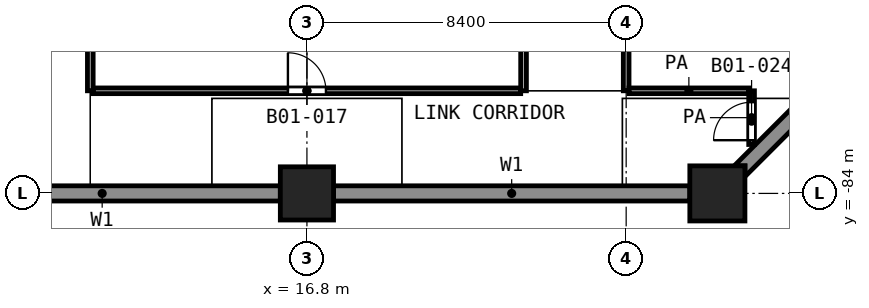
"""IFC4 building model, lengths in metres.
Left out: names, types, materials, properties, quantities, classifications, styles, units other than length and angle.
Written with IfcOpenShell. Run it as: python <this file> out.ifc"""

import sys

from ifc_helpers import new_model, si_unit, direction, frame, frame_2d, origin, origin_2d, place, context, subcontext, project, spatial, polyline, rectangle, outline, extrude, element, fill, save


model = new_model("IFC4")
c1 = context("Model", 3, precision=1e-05, world=origin(), true_north=direction((0.0, 1.0)))
c2 = subcontext(c1, "Body", "Model", "MODEL_VIEW")
j1 = project(units=[si_unit("LENGTHUNIT", "METRE"), si_unit("PLANEANGLEUNIT", "RADIAN")], contexts=[c1])
p1 = place(None, origin())
s1 = spatial("IfcSite", under=j1, at=p1, CompositionType="ELEMENT")
p2 = place(p1, origin())
s2 = spatial("IfcBuilding", under=s1, at=p2, CompositionType="ELEMENT")
p3 = place(p2, frame((0.0, 0.0, -6.0)))
s3 = spatial("IfcBuildingStorey", under=s2, at=p3, CompositionType="ELEMENT", Elevation=-6.0)
p4 = place(p3, origin())
e1 = element("IfcWall", 1, at=p4, inside=s3, PredefinedType="SOLIDWALL", context=c2, shape_type="SweptSolid", body=[
    extrude(outline(polyline([(28.325, -83.275), (28.042, -83.275), (32.875, -78.442), (32.875, -78.725), (33.158, -78.725), (28.325, -83.558), (28.325, -83.275)])), origin(), (0.0, 0.0, 1.0), 5.55),
])
e2 = element("IfcWall", 2, at=p4, inside=s3, PredefinedType="SOLIDWALL", context=c2, shape_type="SweptSolid", body=[
    extrude(outline(polyline([(6.725, -83.8), (16.1, -83.8), (16.1, -84.2), (6.725, -84.2), (6.725, -83.8)])), origin(), (0.0, 0.0, 1.0), 5.55),
])
e3 = element("IfcWall", 3, at=p4, inside=s3, PredefinedType="SOLIDWALL", context=c2, shape_type="SweptSolid", body=[
    extrude(outline(polyline([(17.5, -83.8), (26.875, -83.8), (26.875, -84.2), (17.5, -84.2), (17.5, -83.8)])), origin(), (0.0, 0.0, 1.0), 5.55),
])
p5 = place(p3, frame((16.8, -84.0, 0.0), z_axis=(0.0, 0.0, 1.0), x_axis=(1.0, 0.0, 0.0)))
e4 = element("IfcColumn", 4, at=p5, inside=s3, PredefinedType="COLUMN", context=c2, shape_type="SweptSolid", body=[
    extrude(rectangle(XDim=1.4, YDim=1.4, at=origin_2d()), origin(), (0.0, 0.0, 1.0), 6.0),
])
p6 = place(p3, frame((27.6, -84.0, 0.0), z_axis=(0.0, 0.0, 1.0), x_axis=(1.0, 0.0, 0.0)))
e5 = element("IfcColumn", 5, at=p6, inside=s3, PredefinedType="COLUMN", context=c2, shape_type="SweptSolid", body=[
    extrude(rectangle(XDim=1.45, YDim=1.45, at=origin_2d()), origin(), (0.0, 0.0, 1.0), 6.0),
])
p7 = place(p3, frame((11.175, -81.3, 0.0), z_axis=(0.0, 0.0, 1.0), x_axis=(1.0, 0.0, 0.0)))
e6 = element("IfcWall", 6, at=p7, inside=s3, PredefinedType="PARTITIONING", context=c2, shape_type="SweptSolid", body=[
    extrude(rectangle(XDim=11.25, YDim=0.15, at=frame_2d((5.625, 0.0))), origin(), (0.0, 0.0, 1.0), 5.55),
])
p8 = place(p7, frame((5.125, 0.0, 0.0)))
e7 = element("IfcOpeningElement", 7, at=p8, cuts=e6, PredefinedType="OPENING", context=c2, shape_type="SweptSolid", body=[
    extrude(rectangle(XDim=1.0, YDim=2.1, at=frame_2d((0.5, 1.05))), frame((0.0, 0.085, 0.0), z_axis=(0.0, -1.0, 0.0), x_axis=(1.0, 0.0, 0.0)), (0.0, 0.0, 1.0), 0.17),
])
p9 = place(p3, frame((25.275, -81.3, 0.0), z_axis=(0.0, 0.0, 1.0), x_axis=(1.0, 0.0, 0.0)))
e8 = element("IfcWall", 8, at=p9, inside=s3, PredefinedType="PARTITIONING", context=c2, shape_type="SweptSolid", body=[
    extrude(rectangle(XDim=3.15, YDim=0.15, at=frame_2d((1.575, 0.0))), origin(), (0.0, 0.0, 1.0), 5.55),
])
for number, where, z_axis, x_axis in (
    (9, (11.1, -81.3, 0.0), (0.0, 0.0, 1.0), (0.0, 1.0, 0.0)),
    (10, (22.5, -81.3, 0.0), (0.0, 0.0, 1.0), (0.0, 1.0, 0.0)),
):
    element("IfcWall", number, at=place(p3, frame(where, z_axis=z_axis, x_axis=x_axis)), inside=s3, PredefinedType="PARTITIONING", context=c2, shape_type="SweptSolid", body=[
        extrude(rectangle(XDim=5.6, YDim=0.15, at=frame_2d((2.8, 0.0))), origin(), (0.0, 0.0, 1.0), 5.55),
    ])
p10 = place(p3, frame((25.2, -81.3, 0.0), z_axis=(0.0, 0.0, 1.0), x_axis=(0.0, 1.0, 0.0)))
e11 = element("IfcWall", 11, at=p10, inside=s3, PredefinedType="PARTITIONING", context=c2, shape_type="SweptSolid", body=[
    extrude(rectangle(XDim=56.1, YDim=0.15, at=frame_2d((28.05, 0.0))), origin(), (0.0, 0.0, 1.0), 5.55),
])
p11 = place(p10, frame((37.5, 0.0, 0.0)))
e12 = element("IfcOpeningElement", 12, at=p11, cuts=e11, PredefinedType="OPENING", context=c2, shape_type="SweptSolid", body=[
    extrude(rectangle(XDim=1.0, YDim=2.1, at=frame_2d((0.5, 1.05))), frame((0.0, 0.085, 0.0), z_axis=(0.0, -1.0, 0.0), x_axis=(1.0, 0.0, 0.0)), (0.0, 0.0, 1.0), 0.17),
])
p12 = place(p10, frame((34.0, 0.0, 0.0)))
e13 = element("IfcOpeningElement", 13, at=p12, cuts=e11, PredefinedType="OPENING", context=c2, shape_type="SweptSolid", body=[
    extrude(rectangle(XDim=1.0, YDim=2.1, at=frame_2d((0.5, 1.05))), frame((0.0, 0.085, 0.0), z_axis=(0.0, -1.0, 0.0), x_axis=(1.0, 0.0, 0.0)), (0.0, 0.0, 1.0), 0.17),
])
p13 = place(p10, frame((26.2, 0.0, 0.0)))
e14 = element("IfcOpeningElement", 14, at=p13, cuts=e11, PredefinedType="OPENING", context=c2, shape_type="SweptSolid", body=[
    extrude(rectangle(XDim=1.0, YDim=2.1, at=frame_2d((0.5, 1.05))), frame((0.0, 0.085, 0.0), z_axis=(0.0, -1.0, 0.0), x_axis=(1.0, 0.0, 0.0)), (0.0, 0.0, 1.0), 0.17),
])
p14 = place(p10, frame((17.8, 0.0, 0.0)))
e15 = element("IfcOpeningElement", 15, at=p14, cuts=e11, PredefinedType="OPENING", context=c2, shape_type="SweptSolid", body=[
    extrude(rectangle(XDim=1.0, YDim=2.1, at=frame_2d((0.5, 1.05))), frame((0.0, 0.085, 0.0), z_axis=(0.0, -1.0, 0.0), x_axis=(1.0, 0.0, 0.0)), (0.0, 0.0, 1.0), 0.17),
])
p15 = place(p10, frame((11.65, 0.0, 0.0)))
e16 = element("IfcOpeningElement", 16, at=p15, cuts=e11, PredefinedType="OPENING", context=c2, shape_type="SweptSolid", body=[
    extrude(rectangle(XDim=1.0, YDim=2.1, at=frame_2d((0.5, 1.05))), frame((0.0, 0.085, 0.0), z_axis=(0.0, -1.0, 0.0), x_axis=(1.0, 0.0, 0.0)), (0.0, 0.0, 1.0), 0.17),
])
p16 = place(p10, frame((3.9, 0.0, 0.0)))
e17 = element("IfcOpeningElement", 17, at=p16, cuts=e11, PredefinedType="OPENING", context=c2, shape_type="SweptSolid", body=[
    extrude(rectangle(XDim=1.0, YDim=2.1, at=frame_2d((0.5, 1.05))), frame((0.0, 0.085, 0.0), z_axis=(0.0, -1.0, 0.0), x_axis=(1.0, 0.0, 0.0)), (0.0, 0.0, 1.0), 0.17),
])
p17 = place(p3, frame((28.5, -82.713, 0.0), z_axis=(0.0, 0.0, 1.0), x_axis=(0.0, 1.0, 0.0)))
e18 = element("IfcWall", 18, at=p17, inside=s3, PredefinedType="PARTITIONING", context=c2, shape_type="SweptSolid", body=[
    extrude(rectangle(XDim=1.413, YDim=0.15, at=frame_2d((0.707, 0.0))), origin(), (0.0, 0.0, 1.0), 5.55),
])
p18 = place(p17, frame((0.113, 0.0, 0.0)))
e19 = element("IfcOpeningElement", 19, at=p18, cuts=e18, PredefinedType="OPENING", context=c2, shape_type="SweptSolid", body=[
    extrude(rectangle(XDim=1.0, YDim=2.1, at=frame_2d((0.5, 1.05))), frame((0.0, 0.085, 0.0), z_axis=(0.0, -1.0, 0.0), x_axis=(1.0, 0.0, 0.0)), (0.0, 0.0, 1.0), 0.17),
])
p19 = place(p8, origin())
e20 = element("IfcDoor", 20, at=p19, inside=s3, OperationType="SINGLE_SWING_LEFT", PredefinedType="DOOR", context=c2, shape_type="SweptSolid", body=[
    extrude(rectangle(XDim=1.0, YDim=2.1, at=frame_2d((0.5, 1.05))), frame((0.0, 0.025, 0.0), z_axis=(0.0, -1.0, 0.0), x_axis=(1.0, 0.0, 0.0)), (0.0, 0.0, 1.0), 0.05),
])
fill(e7, e20)
p20 = place(p18, origin())
e21 = element("IfcDoor", 21, at=p20, inside=s3, OperationType="SINGLE_SWING_LEFT", PredefinedType="DOOR", context=c2, shape_type="SweptSolid", body=[
    extrude(rectangle(XDim=1.0, YDim=2.1, at=frame_2d((0.5, 1.05))), frame((0.0, 0.025, 0.0), z_axis=(0.0, -1.0, 0.0), x_axis=(1.0, 0.0, 0.0)), (0.0, 0.0, 1.0), 0.05),
])
fill(e19, e21)
save(model, sys.argv[1])
